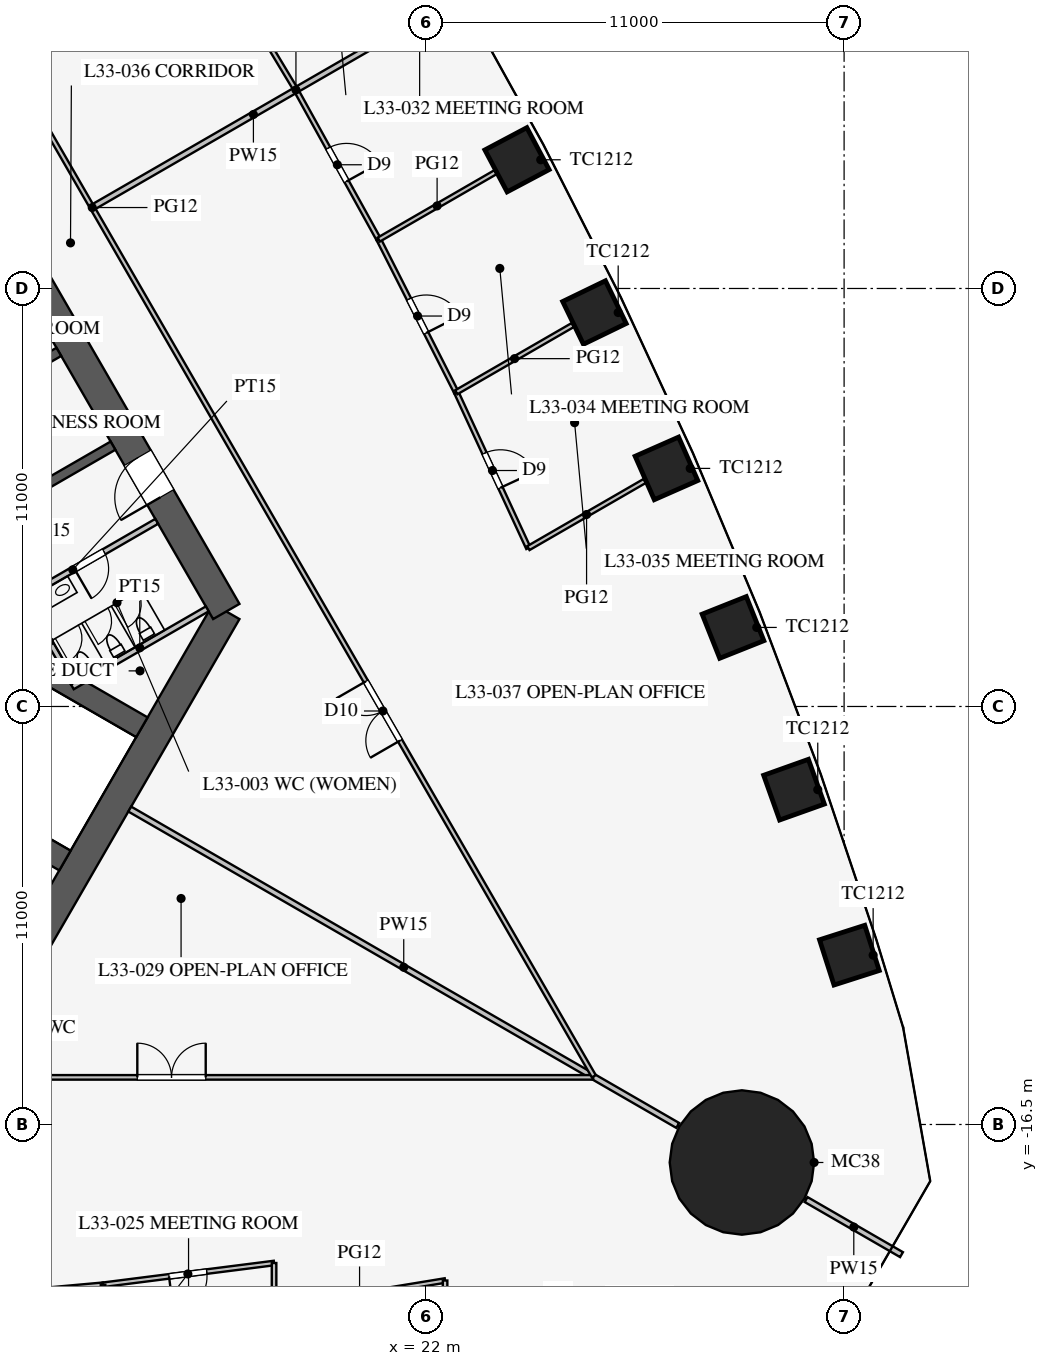
"""IFC4 building model, lengths in metres.
Left out: names, types, materials, properties, quantities, classifications, styles, units other than length and angle.
Written with IfcOpenShell. Run it as: python <this file> out.ifc"""

import sys

from ifc_helpers import new_model, si_unit, direction, frame, frame_2d, origin, origin_2d, place, context, subcontext, project, spatial, rectangle, circle, extrude, element, fill, save


model = new_model("IFC4")
c1 = context("Model", 3, precision=1e-05, world=origin(), true_north=direction((0.0, 1.0)))
c2 = subcontext(c1, "Body", "Model", "MODEL_VIEW")
j1 = project(units=[si_unit("LENGTHUNIT", "METRE"), si_unit("PLANEANGLEUNIT", "RADIAN")], contexts=[c1])
p1 = place(None, origin())
s1 = spatial("IfcSite", under=j1, at=p1, CompositionType="ELEMENT")
p2 = place(p1, origin())
s2 = spatial("IfcBuilding", under=s1, at=p2, CompositionType="ELEMENT")
p3 = place(p2, frame((0.0, 0.0, 145.1)))
s3 = spatial("IfcBuildingStorey", under=s2, at=p3, CompositionType="ELEMENT", Elevation=145.1)
for number, where, z_axis, x_axis in (
    (1, (33.139, -12.044, 0.0), (0.0, 0.0, 1.0), (-0.305, 0.952, 0.0)),
    (2, (31.682, -7.689, 0.0), (0.0, 0.0, 1.0), (-0.336, 0.942, 0.0)),
    (3, (30.077, -3.42, 0.0), (0.0, 0.0, 1.0), (-0.37, 0.929, 0.0)),
    (4, (28.325, 0.765, 0.0), (0.0, 0.0, 1.0), (-0.403, 0.915, 0.0)),
    (5, (26.43, 4.867, 0.0), (0.0, 0.0, 1.0), (-0.436, 0.9, 0.0)),
    (6, (24.393, 8.887, 0.0), (0.0, 0.0, 1.0), (-0.468, 0.883, 0.0)),
):
    element("IfcColumn", number, at=place(p3, frame(where, z_axis=z_axis, x_axis=x_axis)), inside=s3, PredefinedType="COLUMN", context=c2, shape_type="SweptSolid", body=[
        extrude(rectangle(XDim=1.25, YDim=1.25, at=origin_2d()), origin(), (0.0, 0.0, 1.0), 4.2),
    ])
p4 = place(p3, frame((30.311, -17.5, 0.0), z_axis=(0.0, 0.0, 1.0), x_axis=(1.0, 0.0, 0.0)))
e7 = element("IfcColumn", 7, at=p4, inside=s3, PredefinedType="COLUMN", context=c2, shape_type="SweptSolid", body=[
    extrude(circle(Radius=1.9, at=origin_2d()), origin(), (0.0, 0.0, 1.0), 4.2),
])
p5 = place(p3, frame((10.97, -13.0, 0.0), z_axis=(0.0, 0.0, 1.0), x_axis=(0.499995765644, 0.866027848477, 0.0)))
e8 = element("IfcWall", 8, at=p5, inside=s3, PredefinedType="SHEAR", context=c2, shape_type="SweptSolid", body=[
    extrude(rectangle(XDim=11.547, YDim=0.8, at=frame_2d((5.773, 0.0))), origin(), (0.0, 0.0, 1.0), 4.2),
])
p6 = place(p3, frame((16.743, -3.0, 0.0), z_axis=(0.0, 0.0, 1.0), x_axis=(-0.500002442456, 0.866023993627, 0.0)))
e9 = element("IfcWall", 9, at=p6, inside=s3, PredefinedType="SHEAR", context=c2, shape_type="SweptSolid", body=[
    extrude(rectangle(XDim=21.939, YDim=0.8, at=frame_2d((10.97, 0.0))), origin(), (0.0, 0.0, 1.0), 4.2),
])
p7 = place(p6, frame((17.27, 0.0, 0.0)))
e10 = element("IfcOpeningElement", 10, at=p7, cuts=e9, PredefinedType="OPENING", context=c2, shape_type="SweptSolid", body=[
    extrude(rectangle(XDim=1.2, YDim=2.1, at=frame_2d((0.6, 1.05))), frame((0.0, 0.41, 0.0), z_axis=(0.0, -1.0, 0.0), x_axis=(1.0, 0.0, 0.0)), (0.0, 0.0, 1.0), 0.82),
])
p8 = place(p6, frame((3.47, 0.0, 0.0)))
e11 = element("IfcOpeningElement", 11, at=p8, cuts=e9, PredefinedType="OPENING", context=c2, shape_type="SweptSolid", body=[
    extrude(rectangle(XDim=1.2, YDim=2.1, at=frame_2d((0.6, 1.05))), frame((0.0, 0.41, 0.0), z_axis=(0.0, -1.0, 0.0), x_axis=(1.0, 0.0, 0.0)), (0.0, 0.0, 1.0), 0.82),
])
for number, where, z_axis, x_axis in (
    (12, (11.532, 0.076, 0.0), (0.0, 0.0, 1.0), (0.866, 0.5, 0.0)),
    (13, (10.107, 2.544, 0.0), (0.0, 0.0, 1.0), (0.866, 0.5, 0.0)),
):
    element("IfcWall", number, at=place(p3, frame(where, z_axis=z_axis, x_axis=x_axis)), inside=s3, PredefinedType="SHEAR", context=c2, shape_type="SweptSolid", body=[
        extrude(rectangle(XDim=2.575, YDim=0.25, at=frame_2d((1.288, 0.0))), origin(), (0.0, 0.0, 1.0), 4.2),
    ])
for number, where, z_axis, x_axis in (
    (14, (4.638, -5.016, 0.0), (0.0, 0.0, 1.0), (0.866, -0.5, 0.0)),
    (15, (6.663, -1.509, 0.0), (0.0, 0.0, 1.0), (0.866, -0.5, 0.0)),
):
    element("IfcWall", number, at=place(p3, frame(where, z_axis=z_axis, x_axis=x_axis)), inside=s3, PredefinedType="SHEAR", context=c2, shape_type="SweptSolid", body=[
        extrude(rectangle(XDim=9.075, YDim=0.6, at=frame_2d((4.538, 0.0))), origin(), (0.0, 0.0, 1.0), 4.2),
    ])
p9 = place(p3, frame((10.495, -3.178, 0.0), z_axis=(0.0, 0.0, 1.0), x_axis=(0.86602216432, 0.500005610874, 0.0)))
e16 = element("IfcWall", 16, at=p9, inside=s3, PredefinedType="PARTITIONING", context=c2, shape_type="SweptSolid", body=[
    extrude(rectangle(XDim=5.1, YDim=0.15, at=frame_2d((2.55, 0.0))), origin(), (0.0, 0.0, 1.0), 4.0),
])
p10 = place(p9, frame((2.6, 0.0, 0.0)))
e17 = element("IfcOpeningElement", 17, at=p10, cuts=e16, PredefinedType="OPENING", context=c2, shape_type="SweptSolid", body=[
    extrude(rectangle(XDim=0.9, YDim=2.1, at=frame_2d((0.45, 1.05))), frame((0.0, 0.085, 0.0), z_axis=(0.0, -1.0, 0.0), x_axis=(1.0, 0.0, 0.0)), (0.0, 0.0, 1.0), 0.17),
])
p11 = place(p3, frame((12.691, -4.982, 0.0), z_axis=(0.0, 0.0, 1.0), x_axis=(0.8660249478, 0.500000789788, 0.0)))
e18 = element("IfcWall", 18, at=p11, inside=s3, PredefinedType="PARTITIONING", context=c2, shape_type="SweptSolid", body=[
    extrude(rectangle(XDim=4.1, YDim=0.15, at=frame_2d((2.05, 0.0))), origin(), (0.0, 0.0, 1.0), 4.0),
])
p12 = place(p3, frame((11.464, -2.706, 0.0), z_axis=(0.0, 0.0, 1.0), x_axis=(0.50001992892, -0.866013897511, 0.0)))
e19 = element("IfcWall", 19, at=p12, inside=s3, PredefinedType="PARTITIONING", context=c2, shape_type="SweptSolid", body=[
    extrude(rectangle(XDim=2.51, YDim=0.15, at=frame_2d((1.255, 0.0))), origin(), (0.0, 0.0, 1.0), 4.0),
])
p13 = place(p3, frame((14.203, -8.2, 0.0), z_axis=(0.0, 0.0, 1.0), x_axis=(0.866024668836, -0.500001272966, 0.0)))
e20 = element("IfcWall", 20, at=p13, inside=s3, PredefinedType="PARTITIONING", context=c2, shape_type="SweptSolid", body=[
    extrude(rectangle(XDim=16.65, YDim=0.15, at=frame_2d((8.325, 0.0))), origin(), (0.0, 0.0, 1.0), 2.3),
])
p14 = place(p3, frame((32.0, -18.475, 0.0), z_axis=(0.0, 0.0, 1.0), x_axis=(0.866042548026, -0.499970304126, 0.0)))
e21 = element("IfcWall", 21, at=p14, inside=s3, PredefinedType="PARTITIONING", context=c2, shape_type="SweptSolid", body=[
    extrude(rectangle(XDim=2.899, YDim=0.15, at=frame_2d((1.45, 0.0))), origin(), (0.0, 0.0, 1.0), 2.3),
])
p15 = place(p3, frame((-26.398, -15.26, 0.0), z_axis=(0.0, 0.0, 1.0), x_axis=(1.0, 0.0, 0.0)))
e22 = element("IfcWall", 22, at=p15, inside=s3, PredefinedType="PARTITIONING", context=c2, shape_type="SweptSolid", body=[
    extrude(rectangle(XDim=52.796, YDim=0.12, at=frame_2d((26.398, 0.0))), origin(), (0.0, 0.0, 1.0), 2.9),
])
p16 = place(p15, frame((10.2, 0.0, 0.15)))
e23 = element("IfcOpeningElement", 23, at=p16, cuts=e22, PredefinedType="OPENING", context=c2, shape_type="SweptSolid", body=[
    extrude(rectangle(XDim=1.8, YDim=2.1, at=frame_2d((0.9, 1.05))), frame((0.0, 0.07, 0.0), z_axis=(0.0, -1.0, 0.0), x_axis=(1.0, 0.0, 0.0)), (0.0, 0.0, 1.0), 0.14),
])
p17 = place(p15, frame((40.8, 0.0, 0.15)))
e24 = element("IfcOpeningElement", 24, at=p17, cuts=e22, PredefinedType="OPENING", context=c2, shape_type="SweptSolid", body=[
    extrude(rectangle(XDim=1.8, YDim=2.1, at=frame_2d((0.9, 1.05))), frame((0.0, 0.07, 0.0), z_axis=(0.0, -1.0, 0.0), x_axis=(1.0, 0.0, 0.0)), (0.0, 0.0, 1.0), 0.14),
])
p18 = place(p3, frame((13.5, -20.718, 0.0), z_axis=(0.0, 0.0, 1.0), x_axis=(0.992010652594, 0.12615413247, 0.0)))
e25 = element("IfcWall", 25, at=p18, inside=s3, PredefinedType="PARTITIONING", context=c2, shape_type="SweptSolid", body=[
    extrude(rectangle(XDim=4.536, YDim=0.12, at=frame_2d((2.268, 0.0))), origin(), (0.0, 0.0, 1.0), 2.9),
])
p19 = place(p18, frame((1.75, 0.0, 0.15)))
e26 = element("IfcOpeningElement", 26, at=p19, cuts=e25, PredefinedType="OPENING", context=c2, shape_type="SweptSolid", body=[
    extrude(rectangle(XDim=1.0, YDim=2.1, at=frame_2d((0.5, 1.05))), frame((0.0, 0.07, 0.0), z_axis=(0.0, -1.0, 0.0), x_axis=(1.0, 0.0, 0.0)), (0.0, 0.0, 1.0), 0.14),
])
p20 = place(p3, frame((18.0, -21.345, 0.0), z_axis=(0.0, 0.0, 1.0), x_axis=(0.986764681833, 0.162158757664, 0.0)))
e27 = element("IfcWall", 27, at=p20, inside=s3, PredefinedType="PARTITIONING", context=c2, shape_type="SweptSolid", body=[
    extrude(rectangle(XDim=4.56, YDim=0.12, at=frame_2d((2.28, 0.0))), origin(), (0.0, 0.0, 1.0), 2.9),
])
p21 = place(p20, frame((1.85, 0.0, 0.15)))
e28 = element("IfcOpeningElement", 28, at=p21, cuts=e27, PredefinedType="OPENING", context=c2, shape_type="SweptSolid", body=[
    extrude(rectangle(XDim=0.9, YDim=2.1, at=frame_2d((0.45, 1.05))), frame((0.0, 0.07, 0.0), z_axis=(0.0, -1.0, 0.0), x_axis=(1.0, 0.0, 0.0)), (0.0, 0.0, 1.0), 0.14),
])
p22 = place(p3, frame((9.0, -21.125, 0.0), z_axis=(0.0, 0.0, 1.0), x_axis=(0.995930325215, 0.090126507295, 0.0)))
e29 = element("IfcWall", 29, at=p22, inside=s3, PredefinedType="PARTITIONING", context=c2, shape_type="SweptSolid", body=[
    extrude(rectangle(XDim=4.518, YDim=0.12, at=frame_2d((2.259, 0.0))), origin(), (0.0, 0.0, 1.0), 2.9),
])
p23 = place(p22, frame((1.75, 0.0, 0.15)))
e30 = element("IfcOpeningElement", 30, at=p23, cuts=e29, PredefinedType="OPENING", context=c2, shape_type="SweptSolid", body=[
    extrude(rectangle(XDim=1.0, YDim=2.1, at=frame_2d((0.5, 1.05))), frame((0.0, 0.07, 0.0), z_axis=(0.0, -1.0, 0.0), x_axis=(1.0, 0.0, 0.0)), (0.0, 0.0, 1.0), 0.14),
])
p24 = place(p3, frame((13.5, -20.718, 0.0), z_axis=(0.0, 0.0, 1.0), x_axis=(0.0, -1.0, 0.0)))
e31 = element("IfcWall", 31, at=p24, inside=s3, PredefinedType="PARTITIONING", context=c2, shape_type="SweptSolid", body=[
    extrude(rectangle(XDim=3.537, YDim=0.12, at=frame_2d((1.768, 0.0))), origin(), (0.0, 0.0, 1.0), 2.9),
])
p25 = place(p3, frame((18.0, -20.146, 0.0), z_axis=(0.0, 0.0, 1.0), x_axis=(0.0, -1.0, 0.0)))
e32 = element("IfcWall", 32, at=p25, inside=s3, PredefinedType="PARTITIONING", context=c2, shape_type="SweptSolid", body=[
    extrude(rectangle(XDim=3.53, YDim=0.12, at=frame_2d((1.765, 0.0))), origin(), (0.0, 0.0, 1.0), 2.9),
])
p26 = place(p3, frame((22.5, -20.606, 0.0), z_axis=(0.0, 0.0, 1.0), x_axis=(0.0, -1.0, 0.0)))
e33 = element("IfcWall", 33, at=p26, inside=s3, PredefinedType="PARTITIONING", context=c2, shape_type="SweptSolid", body=[
    extrude(rectangle(XDim=2.321, YDim=0.12, at=frame_2d((1.16, 0.0))), origin(), (0.0, 0.0, 1.0), 2.9),
])
p27 = place(p3, frame((13.268, 7.66, 0.0), z_axis=(0.0, 0.0, 1.0), x_axis=(0.866020011605, 0.500009339412, 0.0)))
e34 = element("IfcWall", 34, at=p27, inside=s3, PredefinedType="PARTITIONING", context=c2, shape_type="SweptSolid", body=[
    extrude(rectangle(XDim=9.675, YDim=0.15, at=frame_2d((4.837, 0.0))), origin(), (0.0, 0.0, 1.0), 3.2),
])
p28 = place(p3, frame((26.415, -15.231, 0.0), z_axis=(0.0, 0.0, 1.0), x_axis=(-0.50000091641, 0.866024874695, 0.0)))
e35 = element("IfcWall", 35, at=p28, inside=s3, PredefinedType="PARTITIONING", context=c2, shape_type="SweptSolid", body=[
    extrude(rectangle(XDim=52.796, YDim=0.12, at=frame_2d((26.398, 0.0))), origin(), (0.0, 0.0, 1.0), 2.9),
])
p29 = place(p28, frame((10.2, 0.0, 0.15)))
e36 = element("IfcOpeningElement", 36, at=p29, cuts=e35, PredefinedType="OPENING", context=c2, shape_type="SweptSolid", body=[
    extrude(rectangle(XDim=1.8, YDim=2.1, at=frame_2d((0.9, 1.05))), frame((0.0, 0.07, 0.0), z_axis=(0.0, -1.0, 0.0), x_axis=(1.0, 0.0, 0.0)), (0.0, 0.0, 1.0), 0.14),
])
p30 = place(p28, frame((40.8, 0.0, 0.15)))
e37 = element("IfcOpeningElement", 37, at=p30, cuts=e35, PredefinedType="OPENING", context=c2, shape_type="SweptSolid", body=[
    extrude(rectangle(XDim=1.8, YDim=2.1, at=frame_2d((0.9, 1.05))), frame((0.0, 0.07, 0.0), z_axis=(0.0, -1.0, 0.0), x_axis=(1.0, 0.0, 0.0)), (0.0, 0.0, 1.0), 0.14),
])
p31 = place(p3, frame((18.576, 10.725, 0.0), z_axis=(0.0, 0.0, 1.0), x_axis=(-0.515548366618, 0.856860479703, 0.0)))
e38 = element("IfcWall", 38, at=p31, inside=s3, PredefinedType="PARTITIONING", context=c2, shape_type="SweptSolid", body=[
    extrude(rectangle(XDim=4.501, YDim=0.12, at=frame_2d((2.25, 0.0))), origin(), (0.0, 0.0, 1.0), 2.9),
])
p32 = place(p31, frame((1.75, 0.0, 0.15)))
e39 = element("IfcOpeningElement", 39, at=p32, cuts=e38, PredefinedType="OPENING", context=c2, shape_type="SweptSolid", body=[
    extrude(rectangle(XDim=1.0, YDim=2.1, at=frame_2d((0.5, 1.05))), frame((0.0, 0.07, 0.0), z_axis=(0.0, -1.0, 0.0), x_axis=(1.0, 0.0, 0.0)), (0.0, 0.0, 1.0), 0.14),
])
p33 = place(p3, frame((24.692, -1.333, 0.0), z_axis=(0.0, 0.0, 1.0), x_axis=(-0.41992827805, 0.90755729367, 0.0)))
e40 = element("IfcWall", 40, at=p33, inside=s3, PredefinedType="PARTITIONING", context=c2, shape_type="SweptSolid", body=[
    extrude(rectangle(XDim=4.519, YDim=0.12, at=frame_2d((2.259, 0.0))), origin(), (0.0, 0.0, 1.0), 2.9),
])
p34 = place(p33, frame((1.75, 0.0, 0.15)))
e41 = element("IfcOpeningElement", 41, at=p34, cuts=e40, PredefinedType="OPENING", context=c2, shape_type="SweptSolid", body=[
    extrude(rectangle(XDim=1.0, YDim=2.1, at=frame_2d((0.5, 1.05))), frame((0.0, 0.07, 0.0), z_axis=(0.0, -1.0, 0.0), x_axis=(1.0, 0.0, 0.0)), (0.0, 0.0, 1.0), 0.14),
])
p35 = place(p3, frame((20.756, 6.787, 0.0), z_axis=(0.0, 0.0, 1.0), x_axis=(-0.484292898211, 0.874905931368, 0.0)))
e42 = element("IfcWall", 42, at=p35, inside=s3, PredefinedType="PARTITIONING", context=c2, shape_type="SweptSolid", body=[
    extrude(rectangle(XDim=4.501, YDim=0.12, at=frame_2d((2.25, 0.0))), origin(), (0.0, 0.0, 1.0), 2.9),
])
p36 = place(p35, frame((1.75, 0.0, 0.15)))
e43 = element("IfcOpeningElement", 43, at=p36, cuts=e42, PredefinedType="OPENING", context=c2, shape_type="SweptSolid", body=[
    extrude(rectangle(XDim=1.0, YDim=2.1, at=frame_2d((0.5, 1.05))), frame((0.0, 0.07, 0.0), z_axis=(0.0, -1.0, 0.0), x_axis=(1.0, 0.0, 0.0)), (0.0, 0.0, 1.0), 0.14),
])
p37 = place(p3, frame((22.795, 2.768, 0.0), z_axis=(0.0, 0.0, 1.0), x_axis=(-0.452471679136, 0.891778772779, 0.0)))
e44 = element("IfcWall", 44, at=p37, inside=s3, PredefinedType="PARTITIONING", context=c2, shape_type="SweptSolid", body=[
    extrude(rectangle(XDim=4.507, YDim=0.12, at=frame_2d((2.253, 0.0))), origin(), (0.0, 0.0, 1.0), 2.9),
])
p38 = place(p37, frame((1.75, 0.0, 0.15)))
e45 = element("IfcOpeningElement", 45, at=p38, cuts=e44, PredefinedType="OPENING", context=c2, shape_type="SweptSolid", body=[
    extrude(rectangle(XDim=1.0, YDim=2.1, at=frame_2d((0.5, 1.05))), frame((0.0, 0.07, 0.0), z_axis=(0.0, -1.0, 0.0), x_axis=(1.0, 0.0, 0.0)), (0.0, 0.0, 1.0), 0.14),
])
p39 = place(p3, frame((24.692, -1.333, 0.0), z_axis=(0.0, 0.0, 1.0), x_axis=(0.866021192743, 0.500007293666, 0.0)))
e46 = element("IfcWall", 46, at=p39, inside=s3, PredefinedType="PARTITIONING", context=c2, shape_type="SweptSolid", body=[
    extrude(rectangle(XDim=3.537, YDim=0.12, at=frame_2d((1.768, 0.0))), origin(), (0.0, 0.0, 1.0), 2.9),
])
p40 = place(p3, frame((20.756, 6.787, 0.0), z_axis=(0.0, 0.0, 1.0), x_axis=(0.866038754309, 0.499976875499, 0.0)))
e47 = element("IfcWall", 47, at=p40, inside=s3, PredefinedType="PARTITIONING", context=c2, shape_type="SweptSolid", body=[
    extrude(rectangle(XDim=3.544, YDim=0.12, at=frame_2d((1.772, 0.0))), origin(), (0.0, 0.0, 1.0), 2.9),
])
p41 = place(p3, frame((22.795, 2.768, 0.0), z_axis=(0.0, 0.0, 1.0), x_axis=(0.866045526189, 0.499965145353, 0.0)))
e48 = element("IfcWall", 48, at=p41, inside=s3, PredefinedType="PARTITIONING", context=c2, shape_type="SweptSolid", body=[
    extrude(rectangle(XDim=3.541, YDim=0.12, at=frame_2d((1.771, 0.0))), origin(), (0.0, 0.0, 1.0), 2.9),
])
p42 = place(p10, frame((0.9, 0.0, 0.0), z_axis=(0.0, 0.0, 1.0), x_axis=(-1.0, 0.0, 0.0)))
e49 = element("IfcDoor", 49, at=p42, inside=s3, OperationType="SINGLE_SWING_RIGHT", PredefinedType="DOOR", context=c2, shape_type="SweptSolid", body=[
    extrude(rectangle(XDim=0.9, YDim=2.1, at=frame_2d((0.45, 1.05))), frame((0.0, 0.025, 0.0), z_axis=(0.0, -1.0, 0.0), x_axis=(1.0, 0.0, 0.0)), (0.0, 0.0, 1.0), 0.05),
])
fill(e17, e49)
p43 = place(p8, origin())
e50 = element("IfcDoor", 50, at=p43, inside=s3, OperationType="SINGLE_SWING_LEFT", PredefinedType="DOOR", context=c2, shape_type="SweptSolid", body=[
    extrude(rectangle(XDim=1.2, YDim=2.1, at=frame_2d((0.6, 1.05))), frame((0.0, 0.025, 0.0), z_axis=(0.0, -1.0, 0.0), x_axis=(1.0, 0.0, 0.0)), (0.0, 0.0, 1.0), 0.05),
])
fill(e11, e50)
p44 = place(p19, frame((1.0, 0.0, 0.0), z_axis=(0.0, 0.0, 1.0), x_axis=(-1.0, 0.0, 0.0)))
e51 = element("IfcDoor", 51, at=p44, inside=s3, OperationType="SINGLE_SWING_RIGHT", PredefinedType="DOOR", context=c2, shape_type="SweptSolid", body=[
    extrude(rectangle(XDim=1.0, YDim=2.1, at=frame_2d((0.5, 1.05))), frame((0.0, 0.025, 0.0), z_axis=(0.0, -1.0, 0.0), x_axis=(1.0, 0.0, 0.0)), (0.0, 0.0, 1.0), 0.05),
])
fill(e26, e51)
p45 = place(p17, origin())
e52 = element("IfcDoor", 52, at=p45, inside=s3, OperationType="DOUBLE_DOOR_SINGLE_SWING", PredefinedType="DOOR", context=c2, shape_type="SweptSolid", body=[
    extrude(rectangle(XDim=1.8, YDim=2.1, at=frame_2d((0.9, 1.05))), frame((0.0, 0.025, 0.0), z_axis=(0.0, -1.0, 0.0), x_axis=(1.0, 0.0, 0.0)), (0.0, 0.0, 1.0), 0.05),
])
fill(e24, e52)
p46 = place(p36, frame((1.0, 0.0, 0.0), z_axis=(0.0, 0.0, 1.0), x_axis=(-1.0, 0.0, 0.0)))
e53 = element("IfcDoor", 53, at=p46, inside=s3, OperationType="SINGLE_SWING_RIGHT", PredefinedType="DOOR", context=c2, shape_type="SweptSolid", body=[
    extrude(rectangle(XDim=1.0, YDim=2.1, at=frame_2d((0.5, 1.05))), frame((0.0, 0.025, 0.0), z_axis=(0.0, -1.0, 0.0), x_axis=(1.0, 0.0, 0.0)), (0.0, 0.0, 1.0), 0.05),
])
fill(e43, e53)
p47 = place(p38, frame((1.0, 0.0, 0.0), z_axis=(0.0, 0.0, 1.0), x_axis=(-1.0, 0.0, 0.0)))
e54 = element("IfcDoor", 54, at=p47, inside=s3, OperationType="SINGLE_SWING_RIGHT", PredefinedType="DOOR", context=c2, shape_type="SweptSolid", body=[
    extrude(rectangle(XDim=1.0, YDim=2.1, at=frame_2d((0.5, 1.05))), frame((0.0, 0.025, 0.0), z_axis=(0.0, -1.0, 0.0), x_axis=(1.0, 0.0, 0.0)), (0.0, 0.0, 1.0), 0.05),
])
fill(e45, e54)
p48 = place(p34, frame((1.0, 0.0, 0.0), z_axis=(0.0, 0.0, 1.0), x_axis=(-1.0, 0.0, 0.0)))
e55 = element("IfcDoor", 55, at=p48, inside=s3, OperationType="SINGLE_SWING_RIGHT", PredefinedType="DOOR", context=c2, shape_type="SweptSolid", body=[
    extrude(rectangle(XDim=1.0, YDim=2.1, at=frame_2d((0.5, 1.05))), frame((0.0, 0.025, 0.0), z_axis=(0.0, -1.0, 0.0), x_axis=(1.0, 0.0, 0.0)), (0.0, 0.0, 1.0), 0.05),
])
fill(e41, e55)
p49 = place(p29, origin())
e56 = element("IfcDoor", 56, at=p49, inside=s3, OperationType="DOUBLE_DOOR_SINGLE_SWING", PredefinedType="DOOR", context=c2, shape_type="SweptSolid", body=[
    extrude(rectangle(XDim=1.8, YDim=2.1, at=frame_2d((0.9, 1.05))), frame((0.0, 0.025, 0.0), z_axis=(0.0, -1.0, 0.0), x_axis=(1.0, 0.0, 0.0)), (0.0, 0.0, 1.0), 0.05),
])
fill(e36, e56)
save(model, sys.argv[1])
